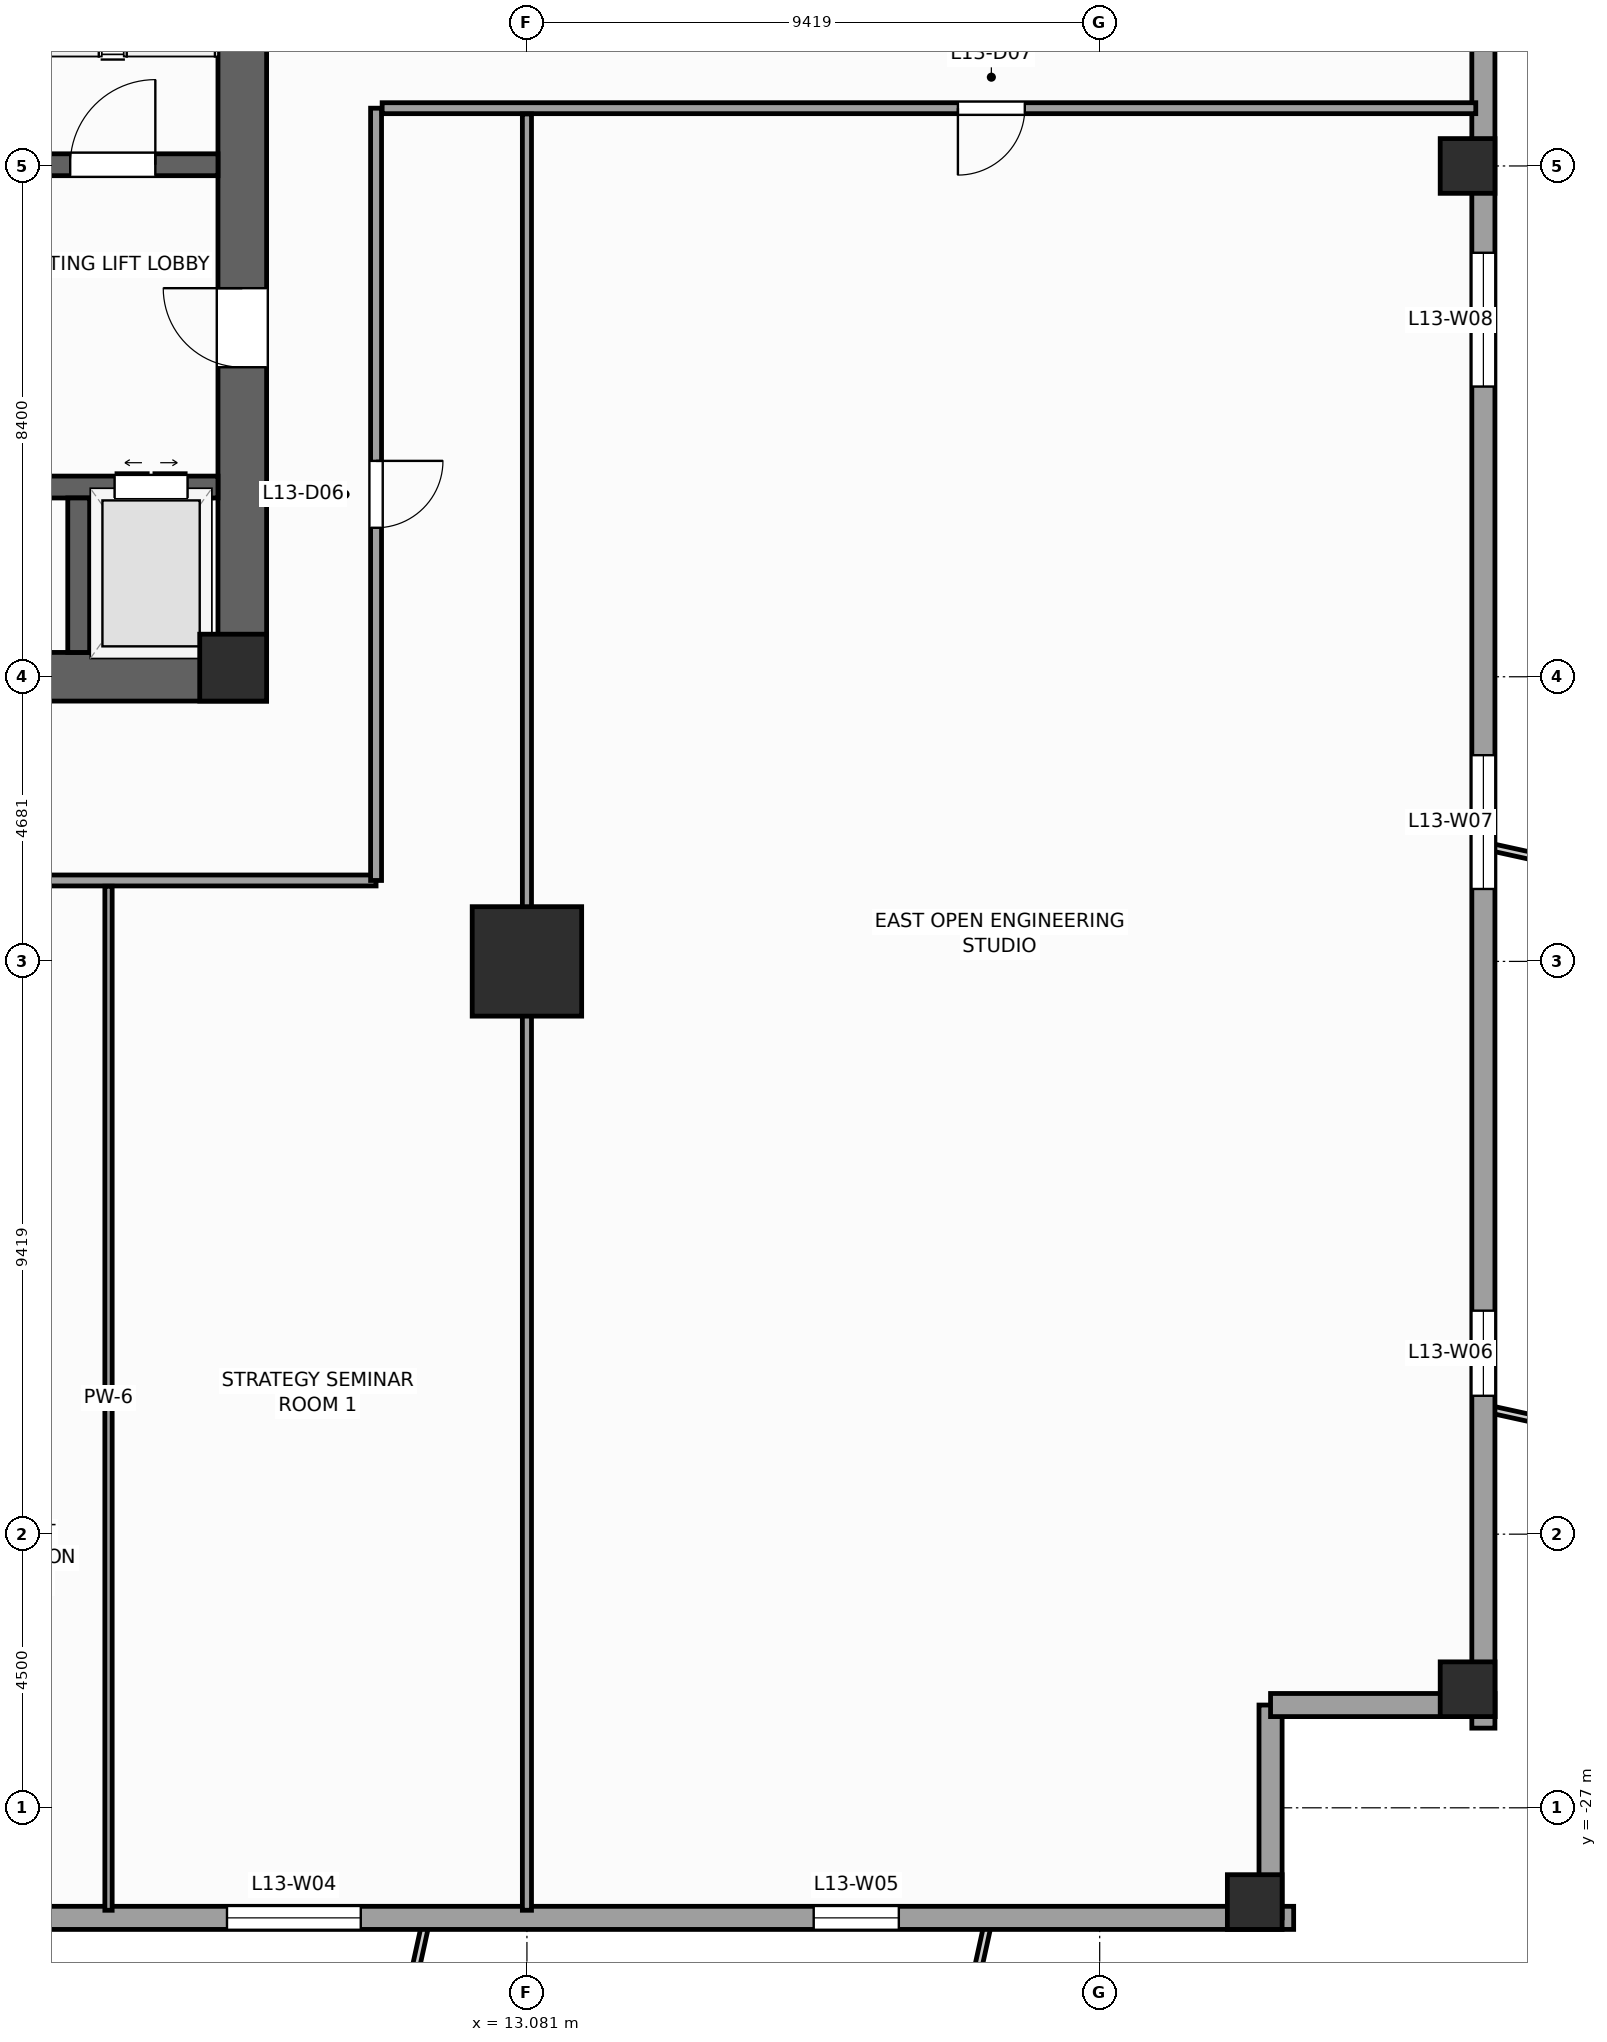
"""IFC4 building model, lengths in metres.
Left out: names, types, materials, properties, quantities, classifications, styles, units other than length and angle.
Written with IfcOpenShell. Run it as: python <this file> out.ifc"""

import sys

from ifc_helpers import new_model, si_unit, direction, frame, frame_2d, origin, origin_2d, place, context, subcontext, project, spatial, rectangle, extrude, source, transform, mapped, element, fill, save


model = new_model("IFC4")
c1 = context("Model", 3, precision=1e-05, world=origin(), true_north=direction((0.0, 1.0)))
c2 = subcontext(c1, "Body", "Model", "MODEL_VIEW")
j1 = project(units=[si_unit("LENGTHUNIT", "METRE"), si_unit("PLANEANGLEUNIT", "RADIAN")], contexts=[c1])
p1 = place(None, origin())
s1 = spatial("IfcSite", under=j1, at=p1, CompositionType="ELEMENT")
p2 = place(p1, origin())
s2 = spatial("IfcBuilding", under=s1, at=p2, CompositionType="ELEMENT")
p3 = place(p2, frame((0.0, 0.0, 58.0)))
s3 = spatial("IfcBuildingStorey", under=s2, at=p3, CompositionType="ELEMENT", Elevation=58.0)
p4 = place(p3, frame((-8.8, -8.4, 0.0), z_axis=(0.0, 0.0, 1.0), x_axis=(1.0, 0.0, 0.0)))
e1 = element("IfcWall", 1, at=p4, inside=s3, PredefinedType="SHEAR", context=c2, shape_type="SweptSolid", body=[
    extrude(rectangle(XDim=17.6, YDim=0.8, at=frame_2d((8.8, 0.0))), origin(), (0.0, 0.0, 1.0), 4.0),
])
p5 = place(p4, frame((8.15, 0.0, 0.0)))
e2 = element("IfcOpeningElement", 2, at=p5, cuts=e1, PredefinedType="OPENING", context=c2, shape_type="SweptSolid", body=[
    extrude(rectangle(XDim=1.3, YDim=2.2, at=frame_2d((0.65, 1.1))), frame((0.0, 0.41, 0.0), z_axis=(0.0, -1.0, 0.0), x_axis=(1.0, 0.0, 0.0)), (0.0, 0.0, 1.0), 0.82),
])
p6 = place(p3, frame((8.4, -8.0, 0.0), z_axis=(0.0, 0.0, 1.0), x_axis=(0.0, 1.0, 0.0)))
e3 = element("IfcWall", 3, at=p6, inside=s3, PredefinedType="SHEAR", context=c2, shape_type="SweptSolid", body=[
    extrude(rectangle(XDim=16.0, YDim=0.8, at=frame_2d((8.0, 0.0))), origin(), (0.0, 0.0, 1.0), 4.0),
])
p7 = place(p6, frame((4.69, 0.0, 0.0)))
e4 = element("IfcOpeningElement", 4, at=p7, cuts=e3, PredefinedType="OPENING", context=c2, shape_type="SweptSolid", body=[
    extrude(rectangle(XDim=1.3, YDim=2.2, at=frame_2d((0.65, 1.1))), frame((0.0, 0.41, 0.0), z_axis=(0.0, -1.0, 0.0), x_axis=(1.0, 0.0, 0.0)), (0.0, 0.0, 1.0), 0.82),
])
p8 = place(p3, frame((4.54, 0.02, 0.0), z_axis=(0.0, 0.0, 1.0), x_axis=(1.0, 0.0, 0.0)))
e5 = element("IfcWall", 5, at=p8, inside=s3, PredefinedType="SHEAR", context=c2, shape_type="SweptSolid", body=[
    extrude(rectangle(XDim=3.46, YDim=0.36, at=frame_2d((1.73, 0.0))), origin(), (0.0, 0.0, 1.0), 4.0),
])
p9 = place(p8, frame((1.03, 0.0, 0.0)))
e6 = element("IfcOpeningElement", 6, at=p9, cuts=e5, PredefinedType="OPENING", context=c2, shape_type="SweptSolid", body=[
    extrude(rectangle(XDim=1.4, YDim=2.2, at=frame_2d((0.7, 1.1))), frame((0.0, 0.19, 0.0), z_axis=(0.0, -1.0, 0.0), x_axis=(1.0, 0.0, 0.0)), (0.0, 0.0, 1.0), 0.38),
])
p10 = place(p3, frame((4.54, -5.28, 0.0), z_axis=(0.0, 0.0, 1.0), x_axis=(1.0, 0.0, 0.0)))
e7 = element("IfcWall", 7, at=p10, inside=s3, PredefinedType="SHEAR", context=c2, shape_type="SweptSolid", body=[
    extrude(rectangle(XDim=3.46, YDim=0.36, at=frame_2d((1.73, 0.0))), origin(), (0.0, 0.0, 1.0), 4.0),
])
p11 = place(p10, frame((1.76, 0.0, 0.0)))
e8 = element("IfcOpeningElement", 8, at=p11, cuts=e7, PredefinedType="OPENING", context=c2, shape_type="SweptSolid", body=[
    extrude(rectangle(XDim=1.2, YDim=2.25, at=frame_2d((0.6, 1.125))), frame((0.0, 0.19, 0.0), z_axis=(0.0, -1.0, 0.0), x_axis=(1.0, 0.0, 0.0)), (0.0, 0.0, 1.0), 0.38),
])
p12 = place(p3, frame((5.71, -8.0, 0.0), z_axis=(0.0, 0.0, 1.0), x_axis=(0.0, 1.0, 0.0)))
e9 = element("IfcWall", 9, at=p12, inside=s3, PredefinedType="SHEAR", context=c2, shape_type="SweptSolid", body=[
    extrude(rectangle(XDim=2.54, YDim=0.36, at=frame_2d((1.27, 0.0))), origin(), (0.0, 0.0, 1.0), 4.0),
])
m1 = source(origin(), c2, "Body", "SweptSolid", [
    extrude(rectangle(XDim=1.1, YDim=1.1, at=origin_2d()), origin(), (0.0, 0.0, 1.0), 4.0),
])
p13 = place(p3, frame((8.25, -8.25, 0.0), z_axis=(0.0, 0.0, 1.0), x_axis=(1.0, 0.0, 0.0)))
e10 = element("IfcColumn", 10, at=p13, inside=s3, PredefinedType="PILASTER", context=c2, shape_type="MappedRepresentation", body=[
    mapped(m1, transform((0.0, 0.0, 0.0), scale=1.0)),
])
m2 = source(origin(), c2, "Body", "SweptSolid", [
    extrude(rectangle(XDim=1.8, YDim=1.8, at=origin_2d()), origin(), (0.0, 0.0, 1.0), 4.0),
])
p14 = place(p3, frame((13.081, -13.081, 0.0), z_axis=(0.0, 0.0, 1.0), x_axis=(1.0, 0.0, 0.0)))
e11 = element("IfcColumn", 11, at=p14, inside=s3, PredefinedType="COLUMN", context=c2, shape_type="MappedRepresentation", body=[
    mapped(m2, transform((0.0, 0.0, 0.0), scale=1.0)),
])
m3 = source(origin(), c2, "Body", "SweptSolid", [
    extrude(rectangle(XDim=0.9, YDim=0.9, at=origin_2d()), origin(), (0.0, 0.0, 1.0), 4.0),
])
for number, where, z_axis, x_axis in (
    (12, (25.05, -28.55, 0.0), (0.0, 0.0, 1.0), (1.0, 0.0, 0.0)),
    (13, (28.55, -25.05, 0.0), (0.0, 0.0, 1.0), (1.0, 0.0, 0.0)),
    (14, (28.55, 0.0, 0.0), (0.0, 0.0, 1.0), (1.0, 0.0, 0.0)),
):
    element("IfcColumn", number, at=place(p3, frame(where, z_axis=z_axis, x_axis=x_axis)), inside=s3, PredefinedType="COLUMN", context=c2, shape_type="MappedRepresentation", body=[
        mapped(m3, transform((0.0, 0.0, 0.0), scale=1.0)),
    ])
p15 = place(p3, frame((-25.69, -28.81, 0.0), z_axis=(0.0, 0.0, 1.0), x_axis=(1.0, 0.0, 0.0)))
e15 = element("IfcWall", 15, at=p15, inside=s3, PredefinedType="STANDARD", context=c2, shape_type="SweptSolid", body=[
    extrude(rectangle(XDim=51.38, YDim=0.38, at=frame_2d((25.69, 0.0))), origin(), (0.0, 0.0, 1.0), 3.12),
])
p16 = place(p15, frame((5.466, 0.0, 0.49)))
e16 = element("IfcOpeningElement", 16, at=p16, cuts=e15, PredefinedType="OPENING", context=c2, shape_type="SweptSolid", body=[
    extrude(rectangle(XDim=1.4, YDim=2.4, at=frame_2d((0.7, 1.2))), frame((0.0, 0.2, 0.0), z_axis=(0.0, -1.0, 0.0), x_axis=(1.0, 0.0, 0.0)), (0.0, 0.0, 1.0), 0.4),
])
p17 = place(p15, frame((13.8, 0.0, 0.49)))
e17 = element("IfcOpeningElement", 17, at=p17, cuts=e15, PredefinedType="OPENING", context=c2, shape_type="SweptSolid", body=[
    extrude(rectangle(XDim=2.2, YDim=2.4, at=frame_2d((1.1, 1.2))), frame((0.0, 0.2, 0.0), z_axis=(0.0, -1.0, 0.0), x_axis=(1.0, 0.0, 0.0)), (0.0, 0.0, 1.0), 0.4),
])
p18 = place(p15, frame((22.062, 0.0, 0.49)))
e18 = element("IfcOpeningElement", 18, at=p18, cuts=e15, PredefinedType="OPENING", context=c2, shape_type="SweptSolid", body=[
    extrude(rectangle(XDim=2.2, YDim=2.4, at=frame_2d((1.1, 1.2))), frame((0.0, 0.2, 0.0), z_axis=(0.0, -1.0, 0.0), x_axis=(1.0, 0.0, 0.0)), (0.0, 0.0, 1.0), 0.4),
])
p19 = place(p15, frame((33.838, 0.0, 0.49)))
e19 = element("IfcOpeningElement", 19, at=p19, cuts=e15, PredefinedType="OPENING", context=c2, shape_type="SweptSolid", body=[
    extrude(rectangle(XDim=2.2, YDim=2.4, at=frame_2d((1.1, 1.2))), frame((0.0, 0.2, 0.0), z_axis=(0.0, -1.0, 0.0), x_axis=(1.0, 0.0, 0.0)), (0.0, 0.0, 1.0), 0.4),
])
p20 = place(p15, frame((43.487, 0.0, 0.49)))
e20 = element("IfcOpeningElement", 20, at=p20, cuts=e15, PredefinedType="OPENING", context=c2, shape_type="SweptSolid", body=[
    extrude(rectangle(XDim=1.4, YDim=2.4, at=frame_2d((0.7, 1.2))), frame((0.0, 0.2, 0.0), z_axis=(0.0, -1.0, 0.0), x_axis=(1.0, 0.0, 0.0)), (0.0, 0.0, 1.0), 0.4),
])
p21 = place(p3, frame((25.31, -28.81, 0.0), z_axis=(0.0, 0.0, 1.0), x_axis=(0.0, 1.0, 0.0)))
e21 = element("IfcWall", 21, at=p21, inside=s3, PredefinedType="STANDARD", context=c2, shape_type="SweptSolid", body=[
    extrude(rectangle(XDim=3.5, YDim=0.38, at=frame_2d((1.75, 0.0))), origin(), (0.0, 0.0, 1.0), 3.72),
])
p22 = place(p3, frame((25.31, -25.31, 0.0), z_axis=(0.0, 0.0, 1.0), x_axis=(1.0, 0.0, 0.0)))
e22 = element("IfcWall", 22, at=p22, inside=s3, PredefinedType="STANDARD", context=c2, shape_type="SweptSolid", body=[
    extrude(rectangle(XDim=3.69, YDim=0.38, at=frame_2d((1.845, 0.0))), origin(), (0.0, 0.0, 1.0), 3.72),
])
p23 = place(p3, frame((28.81, -25.69, 0.0), z_axis=(0.0, 0.0, 1.0), x_axis=(0.0, 1.0, 0.0)))
e23 = element("IfcWall", 23, at=p23, inside=s3, PredefinedType="STANDARD", context=c2, shape_type="SweptSolid", body=[
    extrude(rectangle(XDim=51.38, YDim=0.38, at=frame_2d((25.69, 0.0))), origin(), (0.0, 0.0, 1.0), 3.12),
])
p24 = place(p23, frame((30.765, 0.0, 0.0)))
e24 = element("IfcOpeningElement", 24, at=p24, cuts=e23, PredefinedType="OPENING", context=c2, shape_type="SweptSolid", body=[
    extrude(rectangle(XDim=1.05, YDim=2.25, at=frame_2d((0.525, 1.125))), frame((0.0, 0.2, 0.0), z_axis=(0.0, -1.0, 0.0), x_axis=(1.0, 0.0, 0.0)), (0.0, 0.0, 1.0), 0.4),
])
p25 = place(p23, frame((5.466, 0.0, 0.49)))
e25 = element("IfcOpeningElement", 25, at=p25, cuts=e23, PredefinedType="OPENING", context=c2, shape_type="SweptSolid", body=[
    extrude(rectangle(XDim=1.4, YDim=2.4, at=frame_2d((0.7, 1.2))), frame((0.0, 0.2, 0.0), z_axis=(0.0, -1.0, 0.0), x_axis=(1.0, 0.0, 0.0)), (0.0, 0.0, 1.0), 0.4),
])
p26 = place(p23, frame((13.8, 0.0, 0.49)))
e26 = element("IfcOpeningElement", 26, at=p26, cuts=e23, PredefinedType="OPENING", context=c2, shape_type="SweptSolid", body=[
    extrude(rectangle(XDim=2.2, YDim=2.4, at=frame_2d((1.1, 1.2))), frame((0.0, 0.2, 0.0), z_axis=(0.0, -1.0, 0.0), x_axis=(1.0, 0.0, 0.0)), (0.0, 0.0, 1.0), 0.4),
])
p27 = place(p23, frame((22.062, 0.0, 0.49)))
e27 = element("IfcOpeningElement", 27, at=p27, cuts=e23, PredefinedType="OPENING", context=c2, shape_type="SweptSolid", body=[
    extrude(rectangle(XDim=2.2, YDim=2.4, at=frame_2d((1.1, 1.2))), frame((0.0, 0.2, 0.0), z_axis=(0.0, -1.0, 0.0), x_axis=(1.0, 0.0, 0.0)), (0.0, 0.0, 1.0), 0.4),
])
p28 = place(p23, frame((33.838, 0.0, 0.49)))
e28 = element("IfcOpeningElement", 28, at=p28, cuts=e23, PredefinedType="OPENING", context=c2, shape_type="SweptSolid", body=[
    extrude(rectangle(XDim=2.2, YDim=2.4, at=frame_2d((1.1, 1.2))), frame((0.0, 0.2, 0.0), z_axis=(0.0, -1.0, 0.0), x_axis=(1.0, 0.0, 0.0)), (0.0, 0.0, 1.0), 0.4),
])
p29 = place(p23, frame((43.487, 0.0, 0.49)))
e29 = element("IfcOpeningElement", 29, at=p29, cuts=e23, PredefinedType="OPENING", context=c2, shape_type="SweptSolid", body=[
    extrude(rectangle(XDim=1.4, YDim=2.4, at=frame_2d((0.7, 1.2))), frame((0.0, 0.2, 0.0), z_axis=(0.0, -1.0, 0.0), x_axis=(1.0, 0.0, 0.0)), (0.0, 0.0, 1.0), 0.4),
])
p30 = place(p3, frame((3.25, -11.75, 0.0), z_axis=(0.0, 0.0, 1.0), x_axis=(1.0, 0.0, 0.0)))
e30 = element("IfcWall", 30, at=p30, inside=s3, PredefinedType="PARTITIONING", context=c2, shape_type="SweptSolid", body=[
    extrude(rectangle(XDim=7.35, YDim=0.18, at=frame_2d((3.675, 0.0))), origin(), (0.0, 0.0, 1.0), 3.72),
])
p31 = place(p3, frame((10.6, -11.75, 0.0), z_axis=(0.0, 0.0, 1.0), x_axis=(0.0, 1.0, 0.0)))
e31 = element("IfcWall", 31, at=p31, inside=s3, PredefinedType="PARTITIONING", context=c2, shape_type="SweptSolid", body=[
    extrude(rectangle(XDim=12.7, YDim=0.18, at=frame_2d((6.35, 0.0))), origin(), (0.0, 0.0, 1.0), 3.72),
])
p32 = place(p31, frame((5.8, 0.0, 0.0)))
e32 = element("IfcOpeningElement", 32, at=p32, cuts=e31, PredefinedType="OPENING", context=c2, shape_type="SweptSolid", body=[
    extrude(rectangle(XDim=1.1, YDim=2.2, at=frame_2d((0.55, 1.1))), frame((0.0, 0.1, 0.0), z_axis=(0.0, -1.0, 0.0), x_axis=(1.0, 0.0, 0.0)), (0.0, 0.0, 1.0), 0.2),
])
p33 = place(p3, frame((10.7, 0.95, 0.0), z_axis=(0.0, 0.0, 1.0), x_axis=(1.0, 0.0, 0.0)))
e33 = element("IfcWall", 33, at=p33, inside=s3, PredefinedType="PARTITIONING", context=c2, shape_type="SweptSolid", body=[
    extrude(rectangle(XDim=17.985, YDim=0.18, at=frame_2d((8.993, 0.0))), origin(), (0.0, 0.0, 1.0), 3.72),
])
p34 = place(p33, frame((9.469, 0.0, 0.0)))
e34 = element("IfcOpeningElement", 34, at=p34, cuts=e33, PredefinedType="OPENING", context=c2, shape_type="SweptSolid", body=[
    extrude(rectangle(XDim=1.1, YDim=2.2, at=frame_2d((0.55, 1.1))), frame((0.0, 0.1, 0.0), z_axis=(0.0, -1.0, 0.0), x_axis=(1.0, 0.0, 0.0)), (0.0, 0.0, 1.0), 0.2),
])
p35 = place(p3, frame((6.2, -28.685, 0.0), z_axis=(0.0, 0.0, 1.0), x_axis=(0.0, 1.0, 0.0)))
e35 = element("IfcWall", 35, at=p35, inside=s3, PredefinedType="PARTITIONING", context=c2, shape_type="SweptSolid", body=[
    extrude(rectangle(XDim=16.84, YDim=0.12, at=frame_2d((8.42, 0.0))), origin(), (0.0, 0.0, 1.0), 3.72),
])
p36 = place(p3, frame((13.081, -28.685, 0.0), z_axis=(0.0, 0.0, 1.0), x_axis=(0.0, 1.0, 0.0)))
e36 = element("IfcWall", 36, at=p36, inside=s3, PredefinedType="PARTITIONING", context=c2, shape_type="SweptSolid", body=[
    extrude(rectangle(XDim=29.54, YDim=0.15, at=frame_2d((14.77, 0.0))), origin(), (0.0, 0.0, 1.0), 2.712),
])
m4 = source(origin(), c2, "Body", "SweptSolid", [
    extrude(rectangle(XDim=2.2, YDim=2.4, at=frame_2d((1.1, 1.2))), frame((0.0, 0.03, 0.0), z_axis=(0.0, -1.0, 0.0), x_axis=(1.0, 0.0, 0.0)), (0.0, 0.0, 1.0), 0.06),
])
p37 = place(p19, origin())
e37 = element("IfcWindow", 37, at=p37, inside=s3, PartitioningType="SINGLE_PANEL", PredefinedType="WINDOW", context=c2, shape_type="MappedRepresentation", body=[
    mapped(m4, transform((0.0, 0.0, 0.0), scale=1.0)),
])
fill(e19, e37)
m5 = source(origin(), c2, "Body", "SweptSolid", [
    extrude(rectangle(XDim=1.4, YDim=2.4, at=frame_2d((0.7, 1.2))), frame((0.0, 0.03, 0.0), z_axis=(0.0, -1.0, 0.0), x_axis=(1.0, 0.0, 0.0)), (0.0, 0.0, 1.0), 0.06),
])
p38 = place(p20, origin())
e38 = element("IfcWindow", 38, at=p38, inside=s3, PartitioningType="SINGLE_PANEL", PredefinedType="WINDOW", context=c2, shape_type="MappedRepresentation", body=[
    mapped(m5, transform((0.0, 0.0, 0.0), scale=1.0)),
])
fill(e20, e38)
p39 = place(p25, origin())
e39 = element("IfcWindow", 39, at=p39, inside=s3, PartitioningType="SINGLE_PANEL", PredefinedType="WINDOW", context=c2, shape_type="MappedRepresentation", body=[
    mapped(m5, transform((0.0, 0.0, 0.0), scale=1.0)),
])
fill(e25, e39)
p40 = place(p26, origin())
e40 = element("IfcWindow", 40, at=p40, inside=s3, PartitioningType="SINGLE_PANEL", PredefinedType="WINDOW", context=c2, shape_type="MappedRepresentation", body=[
    mapped(m4, transform((0.0, 0.0, 0.0), scale=1.0)),
])
fill(e26, e40)
p41 = place(p27, origin())
e41 = element("IfcWindow", 41, at=p41, inside=s3, PartitioningType="SINGLE_PANEL", PredefinedType="WINDOW", context=c2, shape_type="MappedRepresentation", body=[
    mapped(m4, transform((0.0, 0.0, 0.0), scale=1.0)),
])
fill(e27, e41)
m6 = source(origin(), c2, "Body", "SweptSolid", [
    extrude(rectangle(XDim=1.4, YDim=2.2, at=frame_2d((0.7, 1.1))), frame((0.0, 0.025, 0.0), z_axis=(0.0, -1.0, 0.0), x_axis=(1.0, 0.0, 0.0)), (0.0, 0.0, 1.0), 0.05),
])
p42 = place(p9, origin())
e42 = element("IfcDoor", 42, at=p42, inside=s3, OperationType="SINGLE_SWING_RIGHT", PredefinedType="DOOR", context=c2, shape_type="MappedRepresentation", body=[
    mapped(m6, transform((0.0, 0.0, 0.0), scale=1.0)),
])
fill(e6, e42)
m7 = source(origin(), c2, "Body", "SweptSolid", [
    extrude(rectangle(XDim=1.3, YDim=2.2, at=frame_2d((0.65, 1.1))), frame((0.0, 0.025, 0.0), z_axis=(0.0, -1.0, 0.0), x_axis=(1.0, 0.0, 0.0)), (0.0, 0.0, 1.0), 0.05),
])
p43 = place(p7, origin())
e43 = element("IfcDoor", 43, at=p43, inside=s3, OperationType="SINGLE_SWING_RIGHT", PredefinedType="DOOR", context=c2, shape_type="MappedRepresentation", body=[
    mapped(m7, transform((0.0, 0.0, 0.0), scale=1.0)),
])
fill(e4, e43)
m8 = source(origin(), c2, "Body", "SweptSolid", [
    extrude(rectangle(XDim=1.2, YDim=2.25, at=frame_2d((0.6, 1.125))), frame((0.0, 0.025, 0.0), z_axis=(0.0, -1.0, 0.0), x_axis=(1.0, 0.0, 0.0)), (0.0, 0.0, 1.0), 0.05),
])
p44 = place(p11, origin())
e44 = element("IfcDoor", 44, at=p44, inside=s3, OperationType="DOUBLE_DOOR_SLIDING", PredefinedType="DOOR", context=c2, shape_type="MappedRepresentation", body=[
    mapped(m8, transform((0.0, 0.0, 0.0), scale=1.0)),
])
fill(e8, e44)
m9 = source(origin(), c2, "Body", "SweptSolid", [
    extrude(rectangle(XDim=1.1, YDim=2.2, at=frame_2d((0.55, 1.1))), frame((0.0, 0.025, 0.0), z_axis=(0.0, -1.0, 0.0), x_axis=(1.0, 0.0, 0.0)), (0.0, 0.0, 1.0), 0.05),
])
p45 = place(p32, frame((1.1, 0.0, 0.0), z_axis=(0.0, 0.0, 1.0), x_axis=(-1.0, 0.0, 0.0)))
e45 = element("IfcDoor", 45, at=p45, inside=s3, OperationType="SINGLE_SWING_RIGHT", PredefinedType="DOOR", context=c2, shape_type="MappedRepresentation", body=[
    mapped(m9, transform((0.0, 0.0, 0.0), scale=1.0)),
])
fill(e32, e45)
p46 = place(p34, frame((1.1, 0.0, 0.0), z_axis=(0.0, 0.0, 1.0), x_axis=(-1.0, 0.0, 0.0)))
e46 = element("IfcDoor", 46, at=p46, inside=s3, OperationType="SINGLE_SWING_LEFT", PredefinedType="DOOR", context=c2, shape_type="MappedRepresentation", body=[
    mapped(m9, transform((0.0, 0.0, 0.0), scale=1.0)),
])
fill(e34, e46)
save(model, sys.argv[1])
